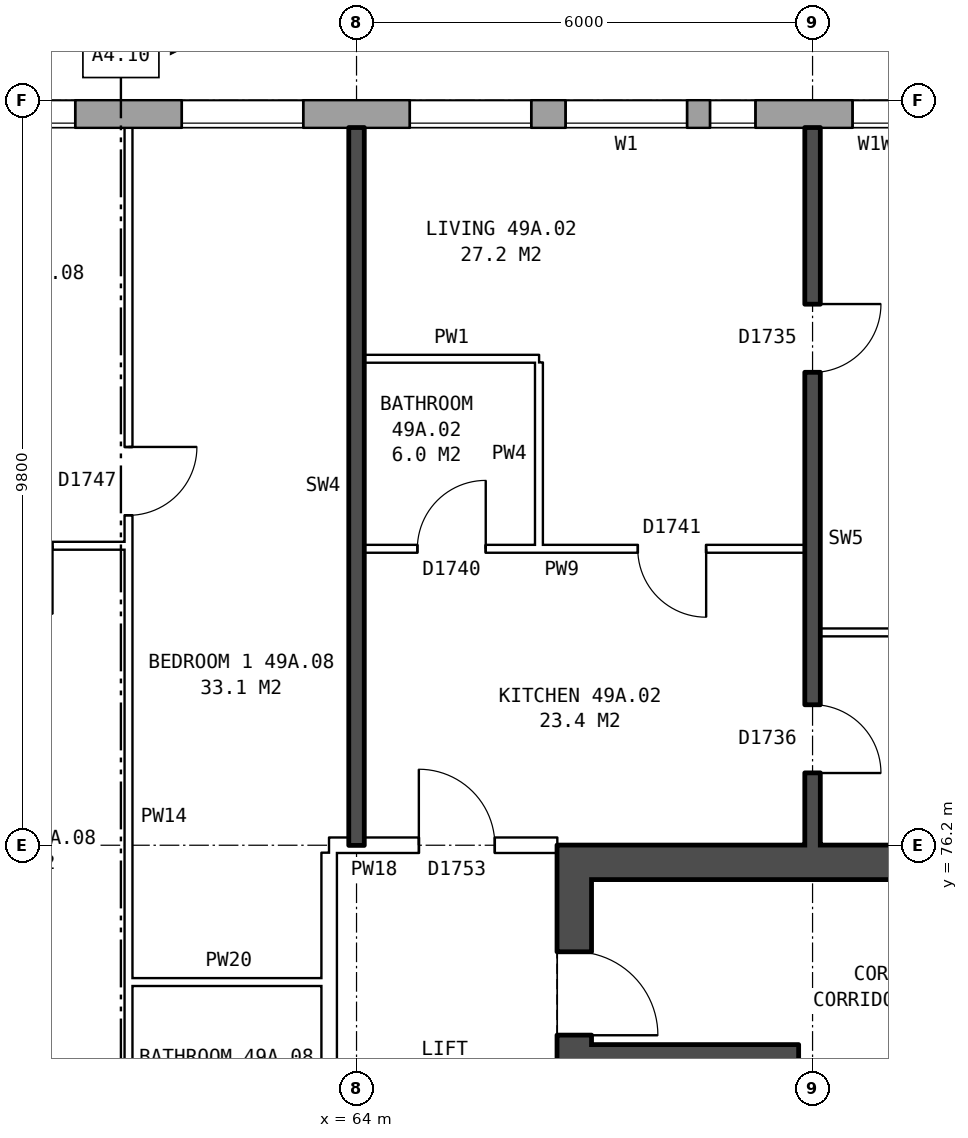
"""IFC4 building model, lengths in metres.
Left out: names, types, materials, properties, quantities, classifications, styles, units other than length and angle.
Written with IfcOpenShell. Run it as: python <this file> out.ifc"""

import sys

from ifc_helpers import new_model, si_unit, direction, frame, frame_2d, origin, place, context, subcontext, project, spatial, rectangle, extrude, element, fill, save


model = new_model("IFC4")
c1 = context("Model", 3, precision=1e-05, world=origin(), true_north=direction((0.0, 1.0)))
c2 = subcontext(c1, "Body", "Model", "MODEL_VIEW")
j1 = project(units=[si_unit("LENGTHUNIT", "METRE"), si_unit("PLANEANGLEUNIT", "RADIAN")], contexts=[c1])
p1 = place(None, origin())
s1 = spatial("IfcSite", under=j1, at=p1, CompositionType="ELEMENT")
p2 = place(p1, origin())
s2 = spatial("IfcBuilding", under=s1, at=p2, CompositionType="ELEMENT")
p3 = place(p2, frame((0.0, 0.0, 175.8)))
s3 = spatial("IfcBuildingStorey", under=s2, at=p3, CompositionType="ELEMENT", Elevation=175.8)
p4 = place(p3, frame((72.925, 85.82, 0.0), z_axis=(0.0, 0.0, 1.0), x_axis=(-1.0, 0.0, 0.0)))
e1 = element("IfcWall", 1, at=p4, inside=s3, PredefinedType="STANDARD", context=c2, shape_type="SweptSolid", body=[
    extrude(rectangle(XDim=39.601, YDim=0.36, at=frame_2d((19.8, 0.0))), origin(), (0.0, 0.0, 1.0), 2.85),
])
p5 = place(p4, frame((0.3, 0.0, 0.8)))
e2 = element("IfcOpeningElement", 2, at=p5, cuts=e1, PredefinedType="OPENING", context=c2, shape_type="SweptSolid", body=[
    extrude(rectangle(XDim=1.2, YDim=1.8, at=frame_2d((0.6, 0.9))), frame((0.0, 0.19, 0.0), z_axis=(0.0, -1.0, 0.0), x_axis=(1.0, 0.0, 0.0)), (0.0, 0.0, 1.0), 0.38),
])
p6 = place(p4, frame((3.675, 0.0, 0.8)))
e3 = element("IfcOpeningElement", 3, at=p6, cuts=e1, PredefinedType="OPENING", context=c2, shape_type="SweptSolid", body=[
    extrude(rectangle(XDim=0.6, YDim=0.9, at=frame_2d((0.3, 0.45))), frame((0.0, 0.19, 0.0), z_axis=(0.0, -1.0, 0.0), x_axis=(1.0, 0.0, 0.0)), (0.0, 0.0, 1.0), 0.38),
])
p7 = place(p4, frame((6.625, 0.0, 0.8)))
e4 = element("IfcOpeningElement", 4, at=p7, cuts=e1, PredefinedType="OPENING", context=c2, shape_type="SweptSolid", body=[
    extrude(rectangle(XDim=1.6, YDim=1.8, at=frame_2d((0.8, 0.9))), frame((0.0, 0.19, 0.0), z_axis=(0.0, -1.0, 0.0), x_axis=(1.0, 0.0, 0.0)), (0.0, 0.0, 1.0), 0.38),
])
p8 = place(p4, frame((9.625, 0.0, 0.8)))
e5 = element("IfcOpeningElement", 5, at=p8, cuts=e1, PredefinedType="OPENING", context=c2, shape_type="SweptSolid", body=[
    extrude(rectangle(XDim=1.6, YDim=1.8, at=frame_2d((0.8, 0.9))), frame((0.0, 0.19, 0.0), z_axis=(0.0, -1.0, 0.0), x_axis=(1.0, 0.0, 0.0)), (0.0, 0.0, 1.0), 0.38),
])
p9 = place(p4, frame((12.625, 0.0, 0.8)))
e6 = element("IfcOpeningElement", 6, at=p9, cuts=e1, PredefinedType="OPENING", context=c2, shape_type="SweptSolid", body=[
    extrude(rectangle(XDim=1.6, YDim=1.8, at=frame_2d((0.8, 0.9))), frame((0.0, 0.19, 0.0), z_axis=(0.0, -1.0, 0.0), x_axis=(1.0, 0.0, 0.0)), (0.0, 0.0, 1.0), 0.38),
])
p10 = place(p4, frame((15.625, 0.0, 0.8)))
e7 = element("IfcOpeningElement", 7, at=p10, cuts=e1, PredefinedType="OPENING", context=c2, shape_type="SweptSolid", body=[
    extrude(rectangle(XDim=1.6, YDim=1.8, at=frame_2d((0.8, 0.9))), frame((0.0, 0.19, 0.0), z_axis=(0.0, -1.0, 0.0), x_axis=(1.0, 0.0, 0.0)), (0.0, 0.0, 1.0), 0.38),
])
p11 = place(p4, frame((18.625, 0.0, 0.8)))
e8 = element("IfcOpeningElement", 8, at=p11, cuts=e1, PredefinedType="OPENING", context=c2, shape_type="SweptSolid", body=[
    extrude(rectangle(XDim=1.6, YDim=1.8, at=frame_2d((0.8, 0.9))), frame((0.0, 0.19, 0.0), z_axis=(0.0, -1.0, 0.0), x_axis=(1.0, 0.0, 0.0)), (0.0, 0.0, 1.0), 0.38),
])
p12 = place(p4, frame((21.625, 0.0, 0.8)))
e9 = element("IfcOpeningElement", 9, at=p12, cuts=e1, PredefinedType="OPENING", context=c2, shape_type="SweptSolid", body=[
    extrude(rectangle(XDim=1.6, YDim=1.8, at=frame_2d((0.8, 0.9))), frame((0.0, 0.19, 0.0), z_axis=(0.0, -1.0, 0.0), x_axis=(1.0, 0.0, 0.0)), (0.0, 0.0, 1.0), 0.38),
])
p13 = place(p4, frame((24.625, 0.0, 0.8)))
e10 = element("IfcOpeningElement", 10, at=p13, cuts=e1, PredefinedType="OPENING", context=c2, shape_type="SweptSolid", body=[
    extrude(rectangle(XDim=1.6, YDim=1.8, at=frame_2d((0.8, 0.9))), frame((0.0, 0.19, 0.0), z_axis=(0.0, -1.0, 0.0), x_axis=(1.0, 0.0, 0.0)), (0.0, 0.0, 1.0), 0.38),
])
p14 = place(p4, frame((27.625, 0.0, 0.8)))
e11 = element("IfcOpeningElement", 11, at=p14, cuts=e1, PredefinedType="OPENING", context=c2, shape_type="SweptSolid", body=[
    extrude(rectangle(XDim=1.6, YDim=1.8, at=frame_2d((0.8, 0.9))), frame((0.0, 0.19, 0.0), z_axis=(0.0, -1.0, 0.0), x_axis=(1.0, 0.0, 0.0)), (0.0, 0.0, 1.0), 0.38),
])
p15 = place(p4, frame((30.625, 0.0, 0.8)))
e12 = element("IfcOpeningElement", 12, at=p15, cuts=e1, PredefinedType="OPENING", context=c2, shape_type="SweptSolid", body=[
    extrude(rectangle(XDim=1.6, YDim=1.8, at=frame_2d((0.8, 0.9))), frame((0.0, 0.19, 0.0), z_axis=(0.0, -1.0, 0.0), x_axis=(1.0, 0.0, 0.0)), (0.0, 0.0, 1.0), 0.38),
])
p16 = place(p4, frame((33.625, 0.0, 0.8)))
e13 = element("IfcOpeningElement", 13, at=p16, cuts=e1, PredefinedType="OPENING", context=c2, shape_type="SweptSolid", body=[
    extrude(rectangle(XDim=1.6, YDim=1.8, at=frame_2d((0.8, 0.9))), frame((0.0, 0.19, 0.0), z_axis=(0.0, -1.0, 0.0), x_axis=(1.0, 0.0, 0.0)), (0.0, 0.0, 1.0), 0.38),
])
p17 = place(p4, frame((37.025, 0.0, 1.7)))
e14 = element("IfcOpeningElement", 14, at=p17, cuts=e1, PredefinedType="OPENING", context=c2, shape_type="SweptSolid", body=[
    extrude(rectangle(XDim=0.8, YDim=0.9, at=frame_2d((0.4, 0.45))), frame((0.0, 0.19, 0.0), z_axis=(0.0, -1.0, 0.0), x_axis=(1.0, 0.0, 0.0)), (0.0, 0.0, 1.0), 0.38),
])
p18 = place(p4, frame((1.8, 0.0, 1.6)))
e15 = element("IfcOpeningElement", 15, at=p18, cuts=e1, PredefinedType="OPENING", context=c2, shape_type="SweptSolid", body=[
    extrude(rectangle(XDim=0.6, YDim=0.9, at=frame_2d((0.3, 0.45))), frame((0.0, 0.19, 0.0), z_axis=(0.0, -1.0, 0.0), x_axis=(1.0, 0.0, 0.0)), (0.0, 0.0, 1.0), 0.38),
])
p19 = place(p4, frame((4.575, 0.0, 0.8)))
e16 = element("IfcOpeningElement", 16, at=p19, cuts=e1, PredefinedType="OPENING", context=c2, shape_type="SweptSolid", body=[
    extrude(rectangle(XDim=1.6, YDim=1.8, at=frame_2d((0.8, 0.9))), frame((0.0, 0.19, 0.0), z_axis=(0.0, -1.0, 0.0), x_axis=(1.0, 0.0, 0.0)), (0.0, 0.0, 1.0), 0.38),
])
p20 = place(p4, frame((38.125, 0.0, 0.8)))
e17 = element("IfcOpeningElement", 17, at=p20, cuts=e1, PredefinedType="OPENING", context=c2, shape_type="SweptSolid", body=[
    extrude(rectangle(XDim=0.6, YDim=1.8, at=frame_2d((0.3, 0.9))), frame((0.0, 0.19, 0.0), z_axis=(0.0, -1.0, 0.0), x_axis=(1.0, 0.0, 0.0)), (0.0, 0.0, 1.0), 0.38),
])
p21 = place(p3, frame((66.865, 63.8, 0.0), z_axis=(0.0, 0.0, 1.0), x_axis=(0.0, 1.0, 0.0)))
e18 = element("IfcWall", 18, at=p21, inside=s3, PredefinedType="SHEAR", context=c2, shape_type="SweptSolid", body=[
    extrude(rectangle(XDim=12.4, YDim=0.45, at=frame_2d((6.2, 0.0))), origin(), (0.0, 0.0, 1.0), 2.85),
])
p22 = place(p21, frame((1.325, 0.0, 0.0)))
e19 = element("IfcOpeningElement", 19, at=p22, cuts=e18, PredefinedType="OPENING", context=c2, shape_type="SweptSolid", body=[
    extrude(rectangle(XDim=1.1, YDim=2.1, at=frame_2d((0.55, 1.05))), frame((0.0, 0.235, 0.0), z_axis=(0.0, -1.0, 0.0), x_axis=(1.0, 0.0, 0.0)), (0.0, 0.0, 1.0), 0.47),
])
p23 = place(p21, frame((3.6, 0.0, 0.0)))
e20 = element("IfcOpeningElement", 20, at=p23, cuts=e18, PredefinedType="OPENING", context=c2, shape_type="SweptSolid", body=[
    extrude(rectangle(XDim=1.1, YDim=2.1, at=frame_2d((0.55, 1.05))), frame((0.0, 0.235, 0.0), z_axis=(0.0, -1.0, 0.0), x_axis=(1.0, 0.0, 0.0)), (0.0, 0.0, 1.0), 0.47),
])
p24 = place(p21, frame((5.8, 0.0, 0.0)))
e21 = element("IfcOpeningElement", 21, at=p24, cuts=e18, PredefinedType="OPENING", context=c2, shape_type="SweptSolid", body=[
    extrude(rectangle(XDim=1.1, YDim=2.1, at=frame_2d((0.55, 1.05))), frame((0.0, 0.235, 0.0), z_axis=(0.0, -1.0, 0.0), x_axis=(1.0, 0.0, 0.0)), (0.0, 0.0, 1.0), 0.47),
])
p25 = place(p21, frame((8.0, 0.0, 0.0)))
e22 = element("IfcOpeningElement", 22, at=p25, cuts=e18, PredefinedType="OPENING", context=c2, shape_type="SweptSolid", body=[
    extrude(rectangle(XDim=1.1, YDim=2.1, at=frame_2d((0.55, 1.05))), frame((0.0, 0.235, 0.0), z_axis=(0.0, -1.0, 0.0), x_axis=(1.0, 0.0, 0.0)), (0.0, 0.0, 1.0), 0.47),
])
p26 = place(p21, frame((9.9, 0.0, 0.0)))
e23 = element("IfcOpeningElement", 23, at=p26, cuts=e18, PredefinedType="OPENING", context=c2, shape_type="SweptSolid", body=[
    extrude(rectangle(XDim=1.1, YDim=2.1, at=frame_2d((0.55, 1.05))), frame((0.0, 0.235, 0.0), z_axis=(0.0, -1.0, 0.0), x_axis=(1.0, 0.0, 0.0)), (0.0, 0.0, 1.0), 0.47),
])
p27 = place(p3, frame((67.09, 75.975, 0.0), z_axis=(0.0, 0.0, 1.0), x_axis=(1.0, 0.0, 0.0)))
e24 = element("IfcWall", 24, at=p27, inside=s3, PredefinedType="SHEAR", context=c2, shape_type="SweptSolid", body=[
    extrude(rectangle(XDim=8.1, YDim=0.45, at=frame_2d((4.05, 0.0))), origin(), (0.0, 0.0, 1.0), 2.85),
])
p28 = place(p3, frame((67.09, 73.45, 0.0), z_axis=(0.0, 0.0, 1.0), x_axis=(1.0, 0.0, 0.0)))
e25 = element("IfcWall", 25, at=p28, inside=s3, PredefinedType="SHEAR", context=c2, shape_type="SweptSolid", body=[
    extrude(rectangle(XDim=2.475, YDim=0.25, at=frame_2d((1.237, 0.0))), origin(), (0.0, 0.0, 1.0), 2.85),
])
p29 = place(p3, frame((69.69, 66.975, 0.0), z_axis=(0.0, 0.0, 1.0), x_axis=(0.0, 1.0, 0.0)))
e26 = element("IfcWall", 26, at=p29, inside=s3, PredefinedType="SHEAR", context=c2, shape_type="SweptSolid", body=[
    extrude(rectangle(XDim=6.6, YDim=0.25, at=frame_2d((3.3, 0.0))), origin(), (0.0, 0.0, 1.0), 2.85),
])
p30 = place(p3, frame((63.64, 63.9, 0.0), z_axis=(0.0, 0.0, 1.0), x_axis=(0.0, 1.0, 0.0)))
e27 = element("IfcWall", 27, at=p30, inside=s3, PredefinedType="PARTITIONING", context=c2, shape_type="SweptSolid", body=[
    extrude(rectangle(XDim=12.2, YDim=0.2, at=frame_2d((6.1, 0.0))), origin(), (0.0, 0.0, 1.0), 2.85),
])
p31 = place(p30, frame((5.1, 0.0, 0.0)))
e28 = element("IfcOpeningElement", 28, at=p31, cuts=e27, PredefinedType="OPENING", context=c2, shape_type="SweptSolid", body=[
    extrude(rectangle(XDim=2.0, YDim=2.1, at=frame_2d((1.0, 1.05))), frame((0.0, 0.11, 0.0), z_axis=(0.0, -1.0, 0.0), x_axis=(1.0, 0.0, 0.0)), (0.0, 0.0, 1.0), 0.22),
])
p32 = place(p3, frame((61.0, 74.4, 0.0), z_axis=(0.0, 0.0, 1.0), x_axis=(1.0, 0.0, 0.0)))
e29 = element("IfcWall", 29, at=p32, inside=s3, PredefinedType="PARTITIONING", context=c2, shape_type="SweptSolid", body=[
    extrude(rectangle(XDim=2.64, YDim=0.1, at=frame_2d((1.32, 0.0))), origin(), (0.0, 0.0, 1.0), 2.85),
])
p33 = place(p3, frame((63.64, 76.2, 0.0), z_axis=(0.0, 0.0, 1.0), x_axis=(1.0, 0.0, 0.0)))
e30 = element("IfcWall", 30, at=p33, inside=s3, PredefinedType="PARTITIONING", context=c2, shape_type="SweptSolid", body=[
    extrude(rectangle(XDim=3.0, YDim=0.2, at=frame_2d((1.5, 0.0))), origin(), (0.0, 0.0, 1.0), 2.85),
])
p34 = place(p33, frame((1.18, 0.0, 0.0)))
e31 = element("IfcOpeningElement", 31, at=p34, cuts=e30, PredefinedType="OPENING", context=c2, shape_type="SweptSolid", body=[
    extrude(rectangle(XDim=1.0, YDim=2.1, at=frame_2d((0.5, 1.05))), frame((0.0, 0.11, 0.0), z_axis=(0.0, -1.0, 0.0), x_axis=(1.0, 0.0, 0.0)), (0.0, 0.0, 1.0), 0.22),
])
p35 = place(p3, frame((70.1, 79.0, 0.0), z_axis=(0.0, 0.0, 1.0), x_axis=(1.0, 0.0, 0.0)))
e32 = element("IfcWall", 32, at=p35, inside=s3, PredefinedType="PARTITIONING", context=c2, shape_type="SweptSolid", body=[
    extrude(rectangle(XDim=5.54, YDim=0.1, at=frame_2d((2.77, 0.0))), origin(), (0.0, 0.0, 1.0), 2.85),
])
p36 = place(p3, frame((64.1, 80.1, 0.0), z_axis=(0.0, 0.0, 1.0), x_axis=(1.0, 0.0, 0.0)))
e33 = element("IfcWall", 33, at=p36, inside=s3, PredefinedType="PARTITIONING", context=c2, shape_type="SweptSolid", body=[
    extrude(rectangle(XDim=5.8, YDim=0.1, at=frame_2d((2.9, 0.0))), origin(), (0.0, 0.0, 1.0), 2.85),
])
p37 = place(p36, frame((3.6, 0.0, 0.0)))
e34 = element("IfcOpeningElement", 34, at=p37, cuts=e33, PredefinedType="OPENING", context=c2, shape_type="SweptSolid", body=[
    extrude(rectangle(XDim=0.9, YDim=2.1, at=frame_2d((0.45, 1.05))), frame((0.0, 0.06, 0.0), z_axis=(0.0, -1.0, 0.0), x_axis=(1.0, 0.0, 0.0)), (0.0, 0.0, 1.0), 0.12),
])
p38 = place(p36, frame((0.7, 0.0, 0.0)))
e35 = element("IfcOpeningElement", 35, at=p38, cuts=e33, PredefinedType="OPENING", context=c2, shape_type="SweptSolid", body=[
    extrude(rectangle(XDim=0.9, YDim=2.1, at=frame_2d((0.45, 1.05))), frame((0.0, 0.06, 0.0), z_axis=(0.0, -1.0, 0.0), x_axis=(1.0, 0.0, 0.0)), (0.0, 0.0, 1.0), 0.12),
])
p39 = place(p3, frame((58.1, 80.14, 0.0), z_axis=(0.0, 0.0, 1.0), x_axis=(1.0, 0.0, 0.0)))
e36 = element("IfcWall", 36, at=p39, inside=s3, PredefinedType="PARTITIONING", context=c2, shape_type="SweptSolid", body=[
    extrude(rectangle(XDim=2.9, YDim=0.1, at=frame_2d((1.45, 0.0))), origin(), (0.0, 0.0, 1.0), 2.85),
])
p40 = place(p39, frame((1.0, 0.0, 0.0)))
e37 = element("IfcOpeningElement", 37, at=p40, cuts=e36, PredefinedType="OPENING", context=c2, shape_type="SweptSolid", body=[
    extrude(rectangle(XDim=0.9, YDim=2.1, at=frame_2d((0.45, 1.05))), frame((0.0, 0.06, 0.0), z_axis=(0.0, -1.0, 0.0), x_axis=(1.0, 0.0, 0.0)), (0.0, 0.0, 1.0), 0.12),
])
p41 = place(p3, frame((64.1, 82.6, 0.0), z_axis=(0.0, 0.0, 1.0), x_axis=(1.0, 0.0, 0.0)))
e38 = element("IfcWall", 38, at=p41, inside=s3, PredefinedType="PARTITIONING", context=c2, shape_type="SweptSolid", body=[
    extrude(rectangle(XDim=2.3, YDim=0.1, at=frame_2d((1.15, 0.0))), origin(), (0.0, 0.0, 1.0), 2.85),
])
p42 = place(p3, frame((61.0, 71.3, 0.0), z_axis=(0.0, 0.0, 1.0), x_axis=(0.0, 1.0, 0.0)))
e39 = element("IfcWall", 39, at=p42, inside=s3, PredefinedType="PARTITIONING", context=c2, shape_type="SweptSolid", body=[
    extrude(rectangle(XDim=14.34, YDim=0.1, at=frame_2d((7.17, 0.0))), origin(), (0.0, 0.0, 1.0), 2.85),
])
p43 = place(p42, frame((9.24, 0.0, 0.0)))
e40 = element("IfcOpeningElement", 40, at=p43, cuts=e39, PredefinedType="OPENING", context=c2, shape_type="SweptSolid", body=[
    extrude(rectangle(XDim=0.9, YDim=2.1, at=frame_2d((0.45, 1.05))), frame((0.0, 0.06, 0.0), z_axis=(0.0, -1.0, 0.0), x_axis=(1.0, 0.0, 0.0)), (0.0, 0.0, 1.0), 0.12),
])
p44 = place(p42, frame((0.4, 0.0, 0.0)))
e41 = element("IfcOpeningElement", 41, at=p44, cuts=e39, PredefinedType="OPENING", context=c2, shape_type="SweptSolid", body=[
    extrude(rectangle(XDim=0.9, YDim=2.1, at=frame_2d((0.45, 1.05))), frame((0.0, 0.06, 0.0), z_axis=(0.0, -1.0, 0.0), x_axis=(1.0, 0.0, 0.0)), (0.0, 0.0, 1.0), 0.12),
])
p45 = place(p3, frame((64.0, 76.2, 0.0), z_axis=(0.0, 0.0, 1.0), x_axis=(0.0, 1.0, 0.0)))
e42 = element("IfcWall", 42, at=p45, inside=s3, PredefinedType="SOLIDWALL", context=c2, shape_type="SweptSolid", body=[
    extrude(rectangle(XDim=9.44, YDim=0.2, at=frame_2d((4.72, 0.0))), origin(), (0.0, 0.0, 1.0), 2.85),
])
p46 = place(p3, frame((66.4, 80.15, 0.0), z_axis=(0.0, 0.0, 1.0), x_axis=(0.0, 1.0, 0.0)))
e43 = element("IfcWall", 43, at=p46, inside=s3, PredefinedType="PARTITIONING", context=c2, shape_type="SweptSolid", body=[
    extrude(rectangle(XDim=2.4, YDim=0.1, at=frame_2d((1.2, 0.0))), origin(), (0.0, 0.0, 1.0), 2.85),
])
p47 = place(p3, frame((70.0, 76.2, 0.0), z_axis=(0.0, 0.0, 1.0), x_axis=(0.0, 1.0, 0.0)))
e44 = element("IfcWall", 44, at=p47, inside=s3, PredefinedType="SOLIDWALL", context=c2, shape_type="SweptSolid", body=[
    extrude(rectangle(XDim=9.44, YDim=0.2, at=frame_2d((4.72, 0.0))), origin(), (0.0, 0.0, 1.0), 2.85),
])
p48 = place(p47, frame((6.22, 0.0, 0.0)))
e45 = element("IfcOpeningElement", 45, at=p48, cuts=e44, PredefinedType="OPENING", context=c2, shape_type="SweptSolid", body=[
    extrude(rectangle(XDim=0.9, YDim=2.1, at=frame_2d((0.45, 1.05))), frame((0.0, 0.11, 0.0), z_axis=(0.0, -1.0, 0.0), x_axis=(1.0, 0.0, 0.0)), (0.0, 0.0, 1.0), 0.22),
])
p49 = place(p47, frame((0.95, 0.0, 0.0)))
e46 = element("IfcOpeningElement", 46, at=p49, cuts=e44, PredefinedType="OPENING", context=c2, shape_type="SweptSolid", body=[
    extrude(rectangle(XDim=0.9, YDim=2.1, at=frame_2d((0.45, 1.05))), frame((0.0, 0.11, 0.0), z_axis=(0.0, -1.0, 0.0), x_axis=(1.0, 0.0, 0.0)), (0.0, 0.0, 1.0), 0.22),
])
p50 = place(p6, origin())
e47 = element("IfcWindow", 47, at=p50, inside=s3, PartitioningType="SINGLE_PANEL", PredefinedType="WINDOW", context=c2, shape_type="SweptSolid", body=[
    extrude(rectangle(XDim=0.6, YDim=0.9, at=frame_2d((0.3, 0.45))), frame((0.0, 0.15, 0.0), z_axis=(0.0, -1.0, 0.0), x_axis=(1.0, 0.0, 0.0)), (0.0, 0.0, 1.0), 0.06),
])
fill(e3, e47)
p51 = place(p7, origin())
e48 = element("IfcWindow", 48, at=p51, inside=s3, PartitioningType="SINGLE_PANEL", PredefinedType="WINDOW", context=c2, shape_type="SweptSolid", body=[
    extrude(rectangle(XDim=1.6, YDim=1.8, at=frame_2d((0.8, 0.9))), frame((0.0, 0.15, 0.0), z_axis=(0.0, -1.0, 0.0), x_axis=(1.0, 0.0, 0.0)), (0.0, 0.0, 1.0), 0.06),
])
fill(e4, e48)
p52 = place(p8, origin())
e49 = element("IfcWindow", 49, at=p52, inside=s3, PartitioningType="SINGLE_PANEL", PredefinedType="WINDOW", context=c2, shape_type="SweptSolid", body=[
    extrude(rectangle(XDim=1.6, YDim=1.8, at=frame_2d((0.8, 0.9))), frame((0.0, 0.15, 0.0), z_axis=(0.0, -1.0, 0.0), x_axis=(1.0, 0.0, 0.0)), (0.0, 0.0, 1.0), 0.06),
])
fill(e5, e49)
p53 = place(p9, origin())
e50 = element("IfcWindow", 50, at=p53, inside=s3, PartitioningType="SINGLE_PANEL", PredefinedType="WINDOW", context=c2, shape_type="SweptSolid", body=[
    extrude(rectangle(XDim=1.6, YDim=1.8, at=frame_2d((0.8, 0.9))), frame((0.0, 0.15, 0.0), z_axis=(0.0, -1.0, 0.0), x_axis=(1.0, 0.0, 0.0)), (0.0, 0.0, 1.0), 0.06),
])
fill(e6, e50)
p54 = place(p26, frame((1.1, 0.0, 0.0), z_axis=(0.0, 0.0, 1.0), x_axis=(-1.0, 0.0, 0.0)))
e51 = element("IfcDoor", 51, at=p54, inside=s3, OperationType="SINGLE_SWING_RIGHT", PredefinedType="DOOR", context=c2, shape_type="SweptSolid", body=[
    extrude(rectangle(XDim=1.1, YDim=2.1, at=frame_2d((0.55, 1.05))), frame((0.0, 0.21, 0.0), z_axis=(0.0, -1.0, 0.0), x_axis=(1.0, 0.0, 0.0)), (0.0, 0.0, 1.0), 0.05),
])
fill(e23, e51)
p55 = place(p48, frame((0.9, 0.0, 0.0), z_axis=(0.0, 0.0, 1.0), x_axis=(-1.0, 0.0, 0.0)))
e52 = element("IfcDoor", 52, at=p55, inside=s3, OperationType="SINGLE_SWING_LEFT", PredefinedType="DOOR", context=c2, shape_type="SweptSolid", body=[
    extrude(rectangle(XDim=0.9, YDim=2.1, at=frame_2d((0.45, 1.05))), frame((0.0, 0.025, 0.0), z_axis=(0.0, -1.0, 0.0), x_axis=(1.0, 0.0, 0.0)), (0.0, 0.0, 1.0), 0.05),
])
fill(e45, e52)
p56 = place(p49, frame((0.9, 0.0, 0.0), z_axis=(0.0, 0.0, 1.0), x_axis=(-1.0, 0.0, 0.0)))
e53 = element("IfcDoor", 53, at=p56, inside=s3, OperationType="SINGLE_SWING_RIGHT", PredefinedType="DOOR", context=c2, shape_type="SweptSolid", body=[
    extrude(rectangle(XDim=0.9, YDim=2.1, at=frame_2d((0.45, 1.05))), frame((0.0, 0.025, 0.0), z_axis=(0.0, -1.0, 0.0), x_axis=(1.0, 0.0, 0.0)), (0.0, 0.0, 1.0), 0.05),
])
fill(e46, e53)
p57 = place(p34, origin())
e54 = element("IfcDoor", 54, at=p57, inside=s3, OperationType="SINGLE_SWING_LEFT", PredefinedType="DOOR", context=c2, shape_type="SweptSolid", body=[
    extrude(rectangle(XDim=1.0, YDim=2.1, at=frame_2d((0.5, 1.05))), frame((0.0, 0.025, 0.0), z_axis=(0.0, -1.0, 0.0), x_axis=(1.0, 0.0, 0.0)), (0.0, 0.0, 1.0), 0.05),
])
fill(e31, e54)
p58 = place(p37, frame((0.9, 0.0, 0.0), z_axis=(0.0, 0.0, 1.0), x_axis=(-1.0, 0.0, 0.0)))
e55 = element("IfcDoor", 55, at=p58, inside=s3, OperationType="SINGLE_SWING_LEFT", PredefinedType="DOOR", context=c2, shape_type="SweptSolid", body=[
    extrude(rectangle(XDim=0.9, YDim=2.1, at=frame_2d((0.45, 1.05))), frame((0.0, 0.025, 0.0), z_axis=(0.0, -1.0, 0.0), x_axis=(1.0, 0.0, 0.0)), (0.0, 0.0, 1.0), 0.05),
])
fill(e34, e55)
p59 = place(p38, origin())
e56 = element("IfcDoor", 56, at=p59, inside=s3, OperationType="SINGLE_SWING_RIGHT", PredefinedType="DOOR", context=c2, shape_type="SweptSolid", body=[
    extrude(rectangle(XDim=0.9, YDim=2.1, at=frame_2d((0.45, 1.05))), frame((0.0, 0.025, 0.0), z_axis=(0.0, -1.0, 0.0), x_axis=(1.0, 0.0, 0.0)), (0.0, 0.0, 1.0), 0.05),
])
fill(e35, e56)
p60 = place(p43, frame((0.9, 0.0, 0.0), z_axis=(0.0, 0.0, 1.0), x_axis=(-1.0, 0.0, 0.0)))
e57 = element("IfcDoor", 57, at=p60, inside=s3, OperationType="SINGLE_SWING_LEFT", PredefinedType="DOOR", context=c2, shape_type="SweptSolid", body=[
    extrude(rectangle(XDim=0.9, YDim=2.1, at=frame_2d((0.45, 1.05))), frame((0.0, 0.025, 0.0), z_axis=(0.0, -1.0, 0.0), x_axis=(1.0, 0.0, 0.0)), (0.0, 0.0, 1.0), 0.05),
])
fill(e40, e57)
p61 = place(p18, origin())
e58 = element("IfcWindow", 58, at=p61, inside=s3, PartitioningType="SINGLE_PANEL", PredefinedType="WINDOW", context=c2, shape_type="SweptSolid", body=[
    extrude(rectangle(XDim=0.6, YDim=0.9, at=frame_2d((0.3, 0.45))), frame((0.0, 0.15, 0.0), z_axis=(0.0, -1.0, 0.0), x_axis=(1.0, 0.0, 0.0)), (0.0, 0.0, 1.0), 0.06),
])
fill(e15, e58)
p62 = place(p19, origin())
e59 = element("IfcWindow", 59, at=p62, inside=s3, PartitioningType="SINGLE_PANEL", PredefinedType="WINDOW", context=c2, shape_type="SweptSolid", body=[
    extrude(rectangle(XDim=1.6, YDim=1.8, at=frame_2d((0.8, 0.9))), frame((0.0, 0.15, 0.0), z_axis=(0.0, -1.0, 0.0), x_axis=(1.0, 0.0, 0.0)), (0.0, 0.0, 1.0), 0.06),
])
fill(e16, e59)
save(model, sys.argv[1])
